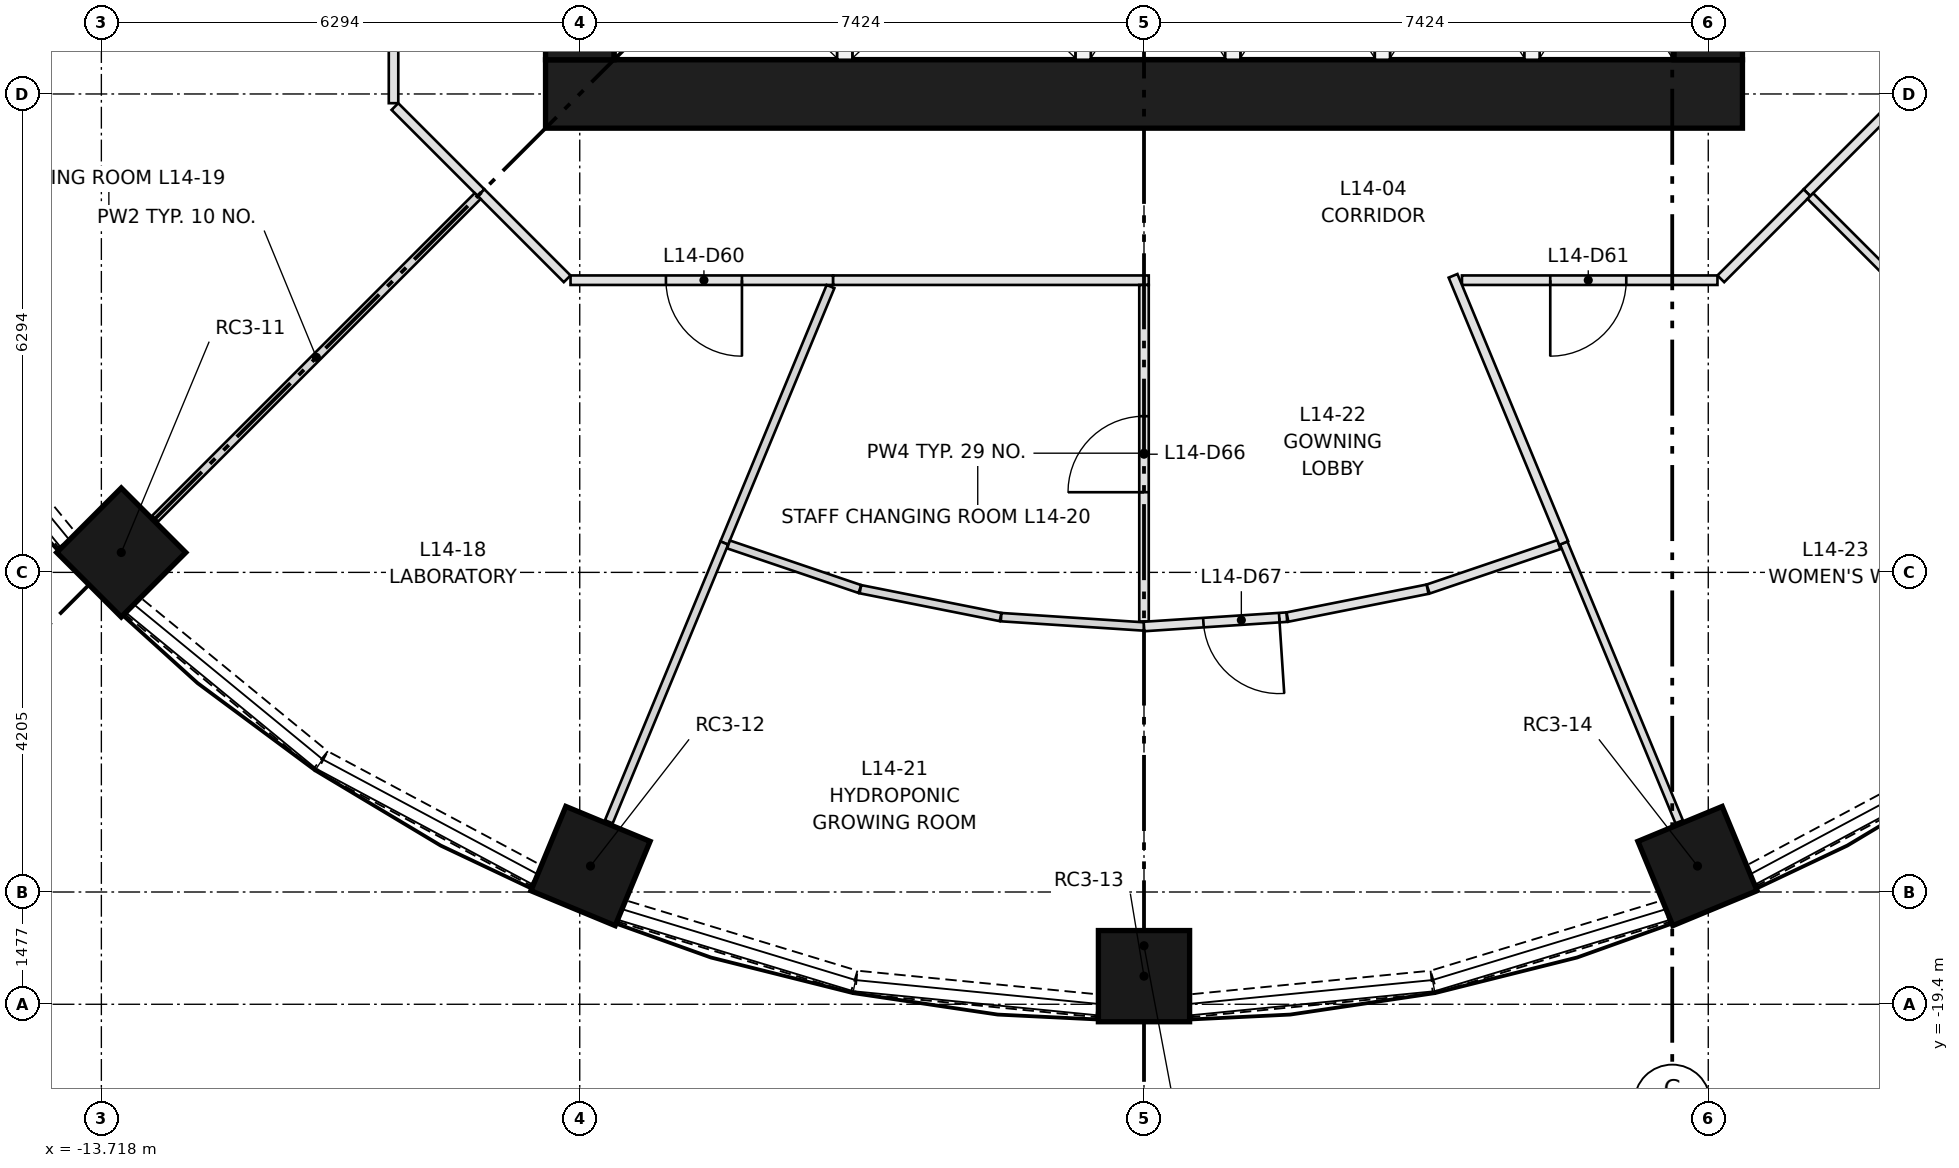
"""IFC4 building model, lengths in metres.
Left out: names, types, materials, properties, quantities, classifications, styles, units other than length and angle.
Written with IfcOpenShell. Run it as: python <this file> out.ifc"""

import sys

from ifc_helpers import new_model, si_unit, direction, frame, frame_2d, origin, origin_2d, place, context, subcontext, project, spatial, rectangle, extrude, element, fill, save


model = new_model("IFC4")
c1 = context("Model", 3, precision=1e-05, world=origin(), true_north=direction((0.0, 1.0)))
c2 = subcontext(c1, "Body", "Model", "MODEL_VIEW")
j1 = project(units=[si_unit("LENGTHUNIT", "METRE"), si_unit("PLANEANGLEUNIT", "RADIAN")], contexts=[c1])
p1 = place(None, origin())
s1 = spatial("IfcSite", under=j1, at=p1, CompositionType="ELEMENT")
p2 = place(p1, origin())
s2 = spatial("IfcBuilding", under=s1, at=p2, CompositionType="ELEMENT")
p3 = place(p2, frame((0.0, 0.0, 55.4)))
s3 = spatial("IfcBuildingStorey", under=s2, at=p3, CompositionType="ELEMENT", Elevation=55.4)
for number, where, z_axis, x_axis in (
    (1, (-13.456, -13.456, 0.0), (0.0, 0.0, 1.0), (-0.707, -0.707, 0.0)),
    (2, (-7.282, -17.582, 0.0), (0.0, 0.0, 1.0), (-0.383, -0.924, 0.0)),
    (3, (0.0, -19.03, 0.0), (0.0, 0.0, 1.0), (0.0, -1.0, 0.0)),
    (4, (7.282, -17.582, 0.0), (0.0, 0.0, 1.0), (0.383, -0.924, 0.0)),
):
    element("IfcColumn", number, at=place(p3, frame(where, z_axis=z_axis, x_axis=x_axis)), inside=s3, PredefinedType="COLUMN", context=c2, shape_type="SweptSolid", body=[
        extrude(rectangle(XDim=1.2, YDim=1.2, at=origin_2d()), origin(), (0.0, 0.0, 1.0), 3.65),
    ])
p4 = place(p3, frame((-7.874, -7.424, 0.0), z_axis=(0.0, 0.0, 1.0), x_axis=(1.0, 0.0, 0.0)))
e5 = element("IfcWall", 5, at=p4, inside=s3, PredefinedType="SHEAR", context=c2, shape_type="SweptSolid", body=[
    extrude(rectangle(XDim=15.748, YDim=0.9, at=frame_2d((7.874, 0.0))), origin(), (0.0, 0.0, 1.0), 3.65),
])
p5 = place(p3, frame((-7.424, -6.974, 0.0), z_axis=(0.0, 0.0, 1.0), x_axis=(0.0, 1.0, 0.0)))
e6 = element("IfcWall", 6, at=p5, inside=s3, PredefinedType="SHEAR", context=c2, shape_type="SweptSolid", body=[
    extrude(rectangle(XDim=13.948, YDim=0.9, at=frame_2d((6.974, 0.0))), origin(), (0.0, 0.0, 1.0), 3.65),
])
p6 = place(p5, frame((6.474, 0.0, 0.0)))
e7 = element("IfcOpeningElement", 7, at=p6, cuts=e6, PredefinedType="OPENING", context=c2, shape_type="SweptSolid", body=[
    extrude(rectangle(XDim=1.0, YDim=2.1, at=frame_2d((0.5, 1.05))), frame((0.0, 0.46, 0.0), z_axis=(0.0, -1.0, 0.0), x_axis=(1.0, 0.0, 0.0)), (0.0, 0.0, 1.0), 0.92),
])
p7 = place(p5, frame((3.35, 0.0, 0.0)))
e8 = element("IfcOpeningElement", 8, at=p7, cuts=e6, PredefinedType="OPENING", context=c2, shape_type="SweptSolid", body=[
    extrude(rectangle(XDim=1.8, YDim=2.1, at=frame_2d((0.9, 1.05))), frame((0.0, 0.46, 0.0), z_axis=(0.0, -1.0, 0.0), x_axis=(1.0, 0.0, 0.0)), (0.0, 0.0, 1.0), 0.92),
])
p8 = place(p5, frame((8.799, 0.0, 0.0)))
e9 = element("IfcOpeningElement", 9, at=p8, cuts=e6, PredefinedType="OPENING", context=c2, shape_type="SweptSolid", body=[
    extrude(rectangle(XDim=1.8, YDim=2.1, at=frame_2d((0.9, 1.05))), frame((0.0, 0.46, 0.0), z_axis=(0.0, -1.0, 0.0), x_axis=(1.0, 0.0, 0.0)), (0.0, 0.0, 1.0), 0.92),
])
p9 = place(p5, frame((11.974, 0.0, 0.0)))
e10 = element("IfcOpeningElement", 10, at=p9, cuts=e6, PredefinedType="OPENING", context=c2, shape_type="SweptSolid", body=[
    extrude(rectangle(XDim=1.0, YDim=2.1, at=frame_2d((0.5, 1.05))), frame((0.0, 0.46, 0.0), z_axis=(0.0, -1.0, 0.0), x_axis=(1.0, 0.0, 0.0)), (0.0, 0.0, 1.0), 0.92),
])
p10 = place(p3, frame((7.424, -6.974, 0.0), z_axis=(0.0, 0.0, 1.0), x_axis=(0.0, 1.0, 0.0)))
e11 = element("IfcWall", 11, at=p10, inside=s3, PredefinedType="SHEAR", context=c2, shape_type="SweptSolid", body=[
    extrude(rectangle(XDim=13.948, YDim=0.9, at=frame_2d((6.974, 0.0))), origin(), (0.0, 0.0, 1.0), 3.65),
])
p11 = place(p10, frame((6.474, 0.0, 0.0)))
e12 = element("IfcOpeningElement", 12, at=p11, cuts=e11, PredefinedType="OPENING", context=c2, shape_type="SweptSolid", body=[
    extrude(rectangle(XDim=1.0, YDim=2.1, at=frame_2d((0.5, 1.05))), frame((0.0, 0.46, 0.0), z_axis=(0.0, -1.0, 0.0), x_axis=(1.0, 0.0, 0.0)), (0.0, 0.0, 1.0), 0.92),
])
p12 = place(p10, frame((3.35, 0.0, 0.0)))
e13 = element("IfcOpeningElement", 13, at=p12, cuts=e11, PredefinedType="OPENING", context=c2, shape_type="SweptSolid", body=[
    extrude(rectangle(XDim=1.8, YDim=2.1, at=frame_2d((0.9, 1.05))), frame((0.0, 0.46, 0.0), z_axis=(0.0, -1.0, 0.0), x_axis=(1.0, 0.0, 0.0)), (0.0, 0.0, 1.0), 0.92),
])
p13 = place(p10, frame((8.799, 0.0, 0.0)))
e14 = element("IfcOpeningElement", 14, at=p13, cuts=e11, PredefinedType="OPENING", context=c2, shape_type="SweptSolid", body=[
    extrude(rectangle(XDim=1.8, YDim=2.1, at=frame_2d((0.9, 1.05))), frame((0.0, 0.46, 0.0), z_axis=(0.0, -1.0, 0.0), x_axis=(1.0, 0.0, 0.0)), (0.0, 0.0, 1.0), 0.92),
])
for number, where, z_axis, x_axis in (
    (15, (-3.937, -6.974, 0.0), (0.0, 0.0, 1.0), (0.0, 1.0, 0.0)),
    (16, (-0.8, -6.974, 0.0), (0.0, 0.0, 1.0), (0.0, 1.0, 0.0)),
    (17, (1.168, -6.974, 0.0), (0.0, 0.0, 1.0), (0.0, 1.0, 0.0)),
    (18, (3.137, -6.974, 0.0), (0.0, 0.0, 1.0), (0.0, 1.0, 0.0)),
    (19, (5.105, -6.974, 0.0), (0.0, 0.0, 1.0), (0.0, 1.0, 0.0)),
):
    element("IfcWall", number, at=place(p3, frame(where, z_axis=z_axis, x_axis=x_axis)), inside=s3, PredefinedType="PARTITIONING", context=c2, shape_type="SweptSolid", body=[
        extrude(rectangle(XDim=2.8, YDim=0.2, at=frame_2d((1.4, 0.0))), origin(), (0.0, 0.0, 1.0), 3.3),
    ])
for number, where, z_axis, x_axis in (
    (20, (-16.188, -10.833, 0.0), (0.0, 0.0, 1.0), (0.634, -0.773, 0.0)),
    (21, (-13.298, -14.166, 0.0), (0.0, 0.0, 1.0), (0.773, -0.634, 0.0)),
):
    element("IfcWall", number, at=place(p3, frame(where, z_axis=z_axis, x_axis=x_axis)), inside=s3, PredefinedType="SOLIDWALL", context=c2, shape_type="SweptSolid", body=[
        extrude(rectangle(XDim=3.188, YDim=0.3, at=frame_2d((1.594, 0.0))), origin(), (0.0, 0.0, 1.0), 0.9),
    ])
p14 = place(p3, frame((-10.809, -16.204, 0.0), z_axis=(0.0, 0.0, 1.0), x_axis=(0.881994263934, -0.471260138764, 0.0)))
e22 = element("IfcWall", 22, at=p14, inside=s3, PredefinedType="SOLIDWALL", context=c2, shape_type="SweptSolid", body=[
    extrude(rectangle(XDim=3.187, YDim=0.3, at=frame_2d((1.593, 0.0))), origin(), (0.0, 0.0, 1.0), 0.9),
])
p15 = place(p3, frame((-6.865, -18.175, 0.0), z_axis=(0.0, 0.0, 1.0), x_axis=(0.956849017819, -0.290585541792, 0.0)))
e23 = element("IfcWall", 23, at=p15, inside=s3, PredefinedType="SOLIDWALL", context=c2, shape_type="SweptSolid", body=[
    extrude(rectangle(XDim=3.188, YDim=0.3, at=frame_2d((1.594, 0.0))), origin(), (0.0, 0.0, 1.0), 0.9),
])
for number, where, z_axis, x_axis in (
    (24, (-3.785, -19.107, 0.0), (0.0, 0.0, 1.0), (0.995, -0.098, 0.0)),
    (25, (0.613, -19.419, 0.0), (0.0, 0.0, 1.0), (0.995, 0.098, 0.0)),
):
    element("IfcWall", number, at=place(p3, frame(where, z_axis=z_axis, x_axis=x_axis)), inside=s3, PredefinedType="SOLIDWALL", context=c2, shape_type="SweptSolid", body=[
        extrude(rectangle(XDim=3.188, YDim=0.3, at=frame_2d((1.594, 0.0))), origin(), (0.0, 0.0, 1.0), 0.9),
    ])
p16 = place(p3, frame((3.814, -19.102, 0.0), z_axis=(0.0, 0.0, 1.0), x_axis=(0.956849017819, 0.290585541792, 0.0)))
e26 = element("IfcWall", 26, at=p16, inside=s3, PredefinedType="SOLIDWALL", context=c2, shape_type="SweptSolid", body=[
    extrude(rectangle(XDim=3.188, YDim=0.3, at=frame_2d((1.594, 0.0))), origin(), (0.0, 0.0, 1.0), 0.9),
])
p17 = place(p3, frame((7.998, -17.706, 0.0), z_axis=(0.0, 0.0, 1.0), x_axis=(0.881994263934, 0.471260138764, 0.0)))
e27 = element("IfcWall", 27, at=p17, inside=s3, PredefinedType="SOLIDWALL", context=c2, shape_type="SweptSolid", body=[
    extrude(rectangle(XDim=3.187, YDim=0.3, at=frame_2d((1.593, 0.0))), origin(), (0.0, 0.0, 1.0), 0.9),
])
p18 = place(p3, frame((9.856, -7.589, 0.0), z_axis=(0.0, 0.0, 1.0), x_axis=(-0.70718294931, -0.707030604857, 0.0)))
e28 = element("IfcWall", 28, at=p18, inside=s3, PredefinedType="PARTITIONING", context=c2, shape_type="SweptSolid", body=[
    extrude(rectangle(XDim=1.603, YDim=0.125, at=frame_2d((0.801, 0.0))), origin(), (0.0, 0.0, 1.0), 3.3),
])
p19 = place(p3, frame((-9.874, -7.545, 0.0), z_axis=(0.0, 0.0, 1.0), x_axis=(0.0, 1.0, 0.0)))
e29 = element("IfcWall", 29, at=p19, inside=s3, PredefinedType="PARTITIONING", context=c2, shape_type="SweptSolid", body=[
    extrude(rectangle(XDim=3.455, YDim=0.125, at=frame_2d((1.728, 0.0))), origin(), (0.0, 0.0, 1.0), 3.3),
])
p20 = place(p19, frame((1.2, 0.0, 0.0)))
e30 = element("IfcOpeningElement", 30, at=p20, cuts=e29, PredefinedType="OPENING", context=c2, shape_type="SweptSolid", body=[
    extrude(rectangle(XDim=1.0, YDim=2.1, at=frame_2d((0.5, 1.05))), frame((0.0, 0.073, 0.0), z_axis=(0.0, -1.0, 0.0), x_axis=(1.0, 0.0, 0.0)), (0.0, 0.0, 1.0), 0.145),
])
for number, where, z_axis, x_axis in (
    (31, (-8.722, -8.722, 0.0), (0.0, 0.0, 1.0), (-0.707, 0.707, 0.0)),
    (32, (-7.589, -9.856, 0.0), (0.0, 0.0, 1.0), (-0.707, 0.707, 0.0)),
):
    element("IfcWall", number, at=place(p3, frame(where, z_axis=z_axis, x_axis=x_axis)), inside=s3, PredefinedType="PARTITIONING", context=c2, shape_type="SweptSolid", body=[
        extrude(rectangle(XDim=1.603, YDim=0.125, at=frame_2d((0.801, 0.0))), origin(), (0.0, 0.0, 1.0), 3.3),
    ])
p21 = place(p3, frame((-4.09, -9.874, 0.0), z_axis=(0.0, 0.0, 1.0), x_axis=(-1.0, 0.0, 0.0)))
e33 = element("IfcWall", 33, at=p21, inside=s3, PredefinedType="PARTITIONING", context=c2, shape_type="SweptSolid", body=[
    extrude(rectangle(XDim=3.455, YDim=0.125, at=frame_2d((1.728, 0.0))), origin(), (0.0, 0.0, 1.0), 3.3),
])
p22 = place(p21, frame((1.2, 0.0, 0.0)))
e34 = element("IfcOpeningElement", 34, at=p22, cuts=e33, PredefinedType="OPENING", context=c2, shape_type="SweptSolid", body=[
    extrude(rectangle(XDim=1.0, YDim=2.1, at=frame_2d((0.5, 1.05))), frame((0.0, 0.073, 0.0), z_axis=(0.0, -1.0, 0.0), x_axis=(1.0, 0.0, 0.0)), (0.0, 0.0, 1.0), 0.145),
])
p23 = place(p3, frame((0.062, -9.874, 0.0), z_axis=(0.0, 0.0, 1.0), x_axis=(-1.0, 0.0, 0.0)))
e35 = element("IfcWall", 35, at=p23, inside=s3, PredefinedType="PARTITIONING", context=c2, shape_type="SweptSolid", body=[
    extrude(rectangle(XDim=4.152, YDim=0.125, at=frame_2d((2.076, 0.0))), origin(), (0.0, 0.0, 1.0), 3.3),
])
p24 = place(p3, frame((7.545, -9.874, 0.0), z_axis=(0.0, 0.0, 1.0), x_axis=(-1.0, 0.0, 0.0)))
e36 = element("IfcWall", 36, at=p24, inside=s3, PredefinedType="PARTITIONING", context=c2, shape_type="SweptSolid", body=[
    extrude(rectangle(XDim=3.362, YDim=0.125, at=frame_2d((1.681, 0.0))), origin(), (0.0, 0.0, 1.0), 3.3),
])
p25 = place(p24, frame((1.2, 0.0, 0.0)))
e37 = element("IfcOpeningElement", 37, at=p25, cuts=e36, PredefinedType="OPENING", context=c2, shape_type="SweptSolid", body=[
    extrude(rectangle(XDim=1.0, YDim=2.1, at=frame_2d((0.5, 1.05))), frame((0.0, 0.073, 0.0), z_axis=(0.0, -1.0, 0.0), x_axis=(1.0, 0.0, 0.0)), (0.0, 0.0, 1.0), 0.145),
])
p26 = place(p3, frame((8.722, -8.722, 0.0), z_axis=(0.0, 0.0, 1.0), x_axis=(-0.707030604857, -0.70718294931, 0.0)))
e38 = element("IfcWall", 38, at=p26, inside=s3, PredefinedType="PARTITIONING", context=c2, shape_type="SweptSolid", body=[
    extrude(rectangle(XDim=1.603, YDim=0.125, at=frame_2d((0.801, 0.0))), origin(), (0.0, 0.0, 1.0), 3.3),
])
p27 = place(p3, frame((-13.147, -5.446, 0.0), z_axis=(0.0, 0.0, 1.0), x_axis=(-0.923873410436, -0.382698212028, 0.0)))
e39 = element("IfcWall", 39, at=p27, inside=s3, PredefinedType="PARTITIONING", context=c2, shape_type="SweptSolid", body=[
    extrude(rectangle(XDim=4.17, YDim=0.11, at=frame_2d((2.085, 0.0))), origin(), (0.0, 0.0, 1.0), 3.3),
])
p28 = place(p3, frame((-13.011, -13.011, 0.0), z_axis=(0.0, 0.0, 1.0), x_axis=(0.707106781187, 0.707106781187, 0.0)))
e40 = element("IfcWall", 40, at=p28, inside=s3, PredefinedType="PARTITIONING", context=c2, shape_type="SweptSolid", body=[
    extrude(rectangle(XDim=6.002, YDim=0.11, at=frame_2d((3.001, 0.0))), origin(), (0.0, 0.0, 1.0), 3.3),
])
p29 = place(p3, frame((-4.125, -9.958, 0.0), z_axis=(0.0, 0.0, 1.0), x_axis=(-0.382715874613, -0.923866093825, 0.0)))
e41 = element("IfcWall", 41, at=p29, inside=s3, PredefinedType="PARTITIONING", context=c2, shape_type="SweptSolid", body=[
    extrude(rectangle(XDim=3.652, YDim=0.11, at=frame_2d((1.826, 0.0))), origin(), (0.0, 0.0, 1.0), 3.3),
])
p30 = place(p3, frame((-5.522, -13.332, 0.0), z_axis=(0.0, 0.0, 1.0), x_axis=(-0.382675844596, -0.923882675432, 0.0)))
e42 = element("IfcWall", 42, at=p30, inside=s3, PredefinedType="PARTITIONING", context=c2, shape_type="SweptSolid", body=[
    extrude(rectangle(XDim=3.97, YDim=0.11, at=frame_2d((1.985, 0.0))), origin(), (0.0, 0.0, 1.0), 3.3),
])
p31 = place(p3, frame((-3.738, -13.937, 0.0), z_axis=(0.0, 0.0, 1.0), x_axis=(-0.94697070508, 0.321319908688, 0.0)))
e43 = element("IfcWall", 43, at=p31, inside=s3, PredefinedType="PARTITIONING", context=c2, shape_type="SweptSolid", body=[
    extrude(rectangle(XDim=1.825, YDim=0.11, at=frame_2d((0.913, 0.0))), origin(), (0.0, 0.0, 1.0), 3.3),
])
p32 = place(p3, frame((-1.887, -14.306, 0.0), z_axis=(0.0, 0.0, 1.0), x_axis=(-0.980774944963, 0.195142274593, 0.0)))
e44 = element("IfcWall", 44, at=p32, inside=s3, PredefinedType="PARTITIONING", context=c2, shape_type="SweptSolid", body=[
    extrude(rectangle(XDim=1.88, YDim=0.11, at=frame_2d((0.94, 0.0))), origin(), (0.0, 0.0, 1.0), 3.3),
])
p33 = place(p3, frame((0.0, -14.43, 0.0), z_axis=(0.0, 0.0, 1.0), x_axis=(-0.997856255434, 0.06544381935, 0.0)))
e45 = element("IfcWall", 45, at=p33, inside=s3, PredefinedType="PARTITIONING", context=c2, shape_type="SweptSolid", body=[
    extrude(rectangle(XDim=1.884, YDim=0.11, at=frame_2d((0.942, 0.0))), origin(), (0.0, 0.0, 1.0), 3.3),
])
p34 = place(p3, frame((0.0, -14.363, 0.0), z_axis=(0.0, 0.0, 1.0), x_axis=(0.0, 1.0, 0.0)))
e46 = element("IfcWall", 46, at=p34, inside=s3, PredefinedType="PARTITIONING", context=c2, shape_type="SweptSolid", body=[
    extrude(rectangle(XDim=4.427, YDim=0.125, at=frame_2d((2.213, 0.0))), origin(), (0.0, 0.0, 1.0), 3.3),
])
p35 = place(p34, frame((1.7, 0.0, 0.0)))
e47 = element("IfcOpeningElement", 47, at=p35, cuts=e46, PredefinedType="OPENING", context=c2, shape_type="SweptSolid", body=[
    extrude(rectangle(XDim=1.0, YDim=2.1, at=frame_2d((0.5, 1.05))), frame((0.0, 0.073, 0.0), z_axis=(0.0, -1.0, 0.0), x_axis=(1.0, 0.0, 0.0)), (0.0, 0.0, 1.0), 0.145),
])
p36 = place(p3, frame((1.879, -14.307, 0.0), z_axis=(0.0, 0.0, 1.0), x_axis=(-0.997863603838, -0.065331677882, 0.0)))
e48 = element("IfcWall", 48, at=p36, inside=s3, PredefinedType="PARTITIONING", context=c2, shape_type="SweptSolid", body=[
    extrude(rectangle(XDim=1.883, YDim=0.125, at=frame_2d((0.942, 0.0))), origin(), (0.0, 0.0, 1.0), 3.3),
])
p37 = place(p36, frame((0.1, 0.0, 0.0)))
e49 = element("IfcOpeningElement", 49, at=p37, cuts=e48, PredefinedType="OPENING", context=c2, shape_type="SweptSolid", body=[
    extrude(rectangle(XDim=1.0, YDim=2.1, at=frame_2d((0.5, 1.05))), frame((0.0, 0.073, 0.0), z_axis=(0.0, -1.0, 0.0), x_axis=(1.0, 0.0, 0.0)), (0.0, 0.0, 1.0), 0.145),
])
p38 = place(p3, frame((1.887, -14.306, 0.0), z_axis=(0.0, 0.0, 1.0), x_axis=(0.980804871908, 0.194991803011, 0.0)))
e50 = element("IfcWall", 50, at=p38, inside=s3, PredefinedType="PARTITIONING", context=c2, shape_type="SweptSolid", body=[
    extrude(rectangle(XDim=1.879, YDim=0.125, at=frame_2d((0.94, 0.0))), origin(), (0.0, 0.0, 1.0), 3.3),
])
p39 = place(p3, frame((3.739, -13.937, 0.0), z_axis=(0.0, 0.0, 1.0), x_axis=(0.946921731465, 0.32146420404, 0.0)))
e51 = element("IfcWall", 51, at=p39, inside=s3, PredefinedType="PARTITIONING", context=c2, shape_type="SweptSolid", body=[
    extrude(rectangle(XDim=1.817, YDim=0.125, at=frame_2d((0.908, 0.0))), origin(), (0.0, 0.0, 1.0), 3.3),
])
p40 = place(p3, frame((5.522, -13.332, 0.0), z_axis=(0.0, 0.0, 1.0), x_axis=(0.382675844596, -0.923882675432, 0.0)))
e52 = element("IfcWall", 52, at=p40, inside=s3, PredefinedType="PARTITIONING", context=c2, shape_type="SweptSolid", body=[
    extrude(rectangle(XDim=3.97, YDim=0.105, at=frame_2d((1.985, 0.0))), origin(), (0.0, 0.0, 1.0), 3.3),
])
p41 = place(p3, frame((4.066, -9.816, 0.0), z_axis=(0.0, 0.0, 1.0), x_axis=(0.382746586719, -0.923853370592, 0.0)))
e53 = element("IfcWall", 53, at=p41, inside=s3, PredefinedType="PARTITIONING", context=c2, shape_type="SweptSolid", body=[
    extrude(rectangle(XDim=3.805, YDim=0.125, at=frame_2d((1.902, 0.0))), origin(), (0.0, 0.0, 1.0), 3.3),
])
p42 = place(p3, frame((8.767, -8.767, 0.0), z_axis=(0.0, 0.0, 1.0), x_axis=(0.707106781187, -0.707106781187, 0.0)))
e54 = element("IfcWall", 54, at=p42, inside=s3, PredefinedType="PARTITIONING", context=c2, shape_type="SweptSolid", body=[
    extrude(rectangle(XDim=6.002, YDim=0.105, at=frame_2d((3.001, 0.0))), origin(), (0.0, 0.0, 1.0), 3.3),
])
p43 = place(p22, origin())
e55 = element("IfcDoor", 55, at=p43, inside=s3, OperationType="SINGLE_SWING_LEFT", PredefinedType="DOOR", context=c2, shape_type="SweptSolid", body=[
    extrude(rectangle(XDim=1.0, YDim=2.1, at=frame_2d((0.5, 1.05))), frame((0.0, 0.025, 0.0), z_axis=(0.0, -1.0, 0.0), x_axis=(1.0, 0.0, 0.0)), (0.0, 0.0, 1.0), 0.05),
])
fill(e34, e55)
p44 = place(p25, origin())
e56 = element("IfcDoor", 56, at=p44, inside=s3, OperationType="SINGLE_SWING_RIGHT", PredefinedType="DOOR", context=c2, shape_type="SweptSolid", body=[
    extrude(rectangle(XDim=1.0, YDim=2.1, at=frame_2d((0.5, 1.05))), frame((0.0, 0.025, 0.0), z_axis=(0.0, -1.0, 0.0), x_axis=(1.0, 0.0, 0.0)), (0.0, 0.0, 1.0), 0.05),
])
fill(e37, e56)
p45 = place(p35, origin())
e57 = element("IfcDoor", 57, at=p45, inside=s3, OperationType="SINGLE_SWING_LEFT", PredefinedType="DOOR", context=c2, shape_type="SweptSolid", body=[
    extrude(rectangle(XDim=1.0, YDim=2.1, at=frame_2d((0.5, 1.05))), frame((0.0, 0.025, 0.0), z_axis=(0.0, -1.0, 0.0), x_axis=(1.0, 0.0, 0.0)), (0.0, 0.0, 1.0), 0.05),
])
fill(e47, e57)
p46 = place(p37, origin())
e58 = element("IfcDoor", 58, at=p46, inside=s3, OperationType="SINGLE_SWING_LEFT", PredefinedType="DOOR", context=c2, shape_type="SweptSolid", body=[
    extrude(rectangle(XDim=1.0, YDim=2.1, at=frame_2d((0.5, 1.05))), frame((0.0, 0.025, 0.0), z_axis=(0.0, -1.0, 0.0), x_axis=(1.0, 0.0, 0.0)), (0.0, 0.0, 1.0), 0.05),
])
fill(e49, e58)
save(model, sys.argv[1])
